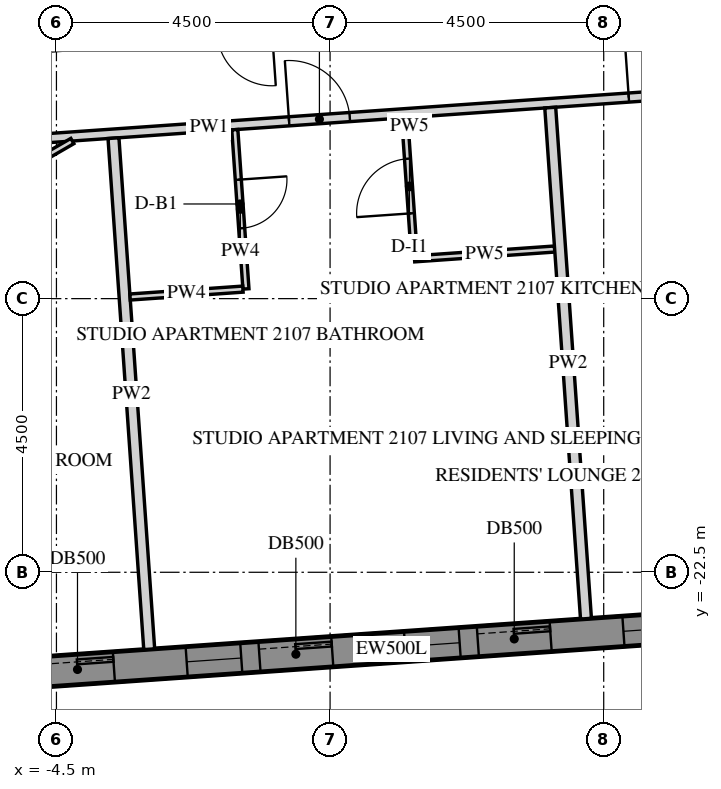
"""IFC4 building model, lengths in metres.
Left out: names, types, materials, properties, quantities, classifications, styles, units other than length and angle.
Written with IfcOpenShell. Run it as: python <this file> out.ifc"""

import sys

from ifc_helpers import new_model, si_unit, direction, frame, frame_2d, origin, place, context, subcontext, project, spatial, polyline, rectangle, outline, extrude, element, fill, save


model = new_model("IFC4")
c1 = context("Model", 3, precision=1e-05, world=origin(), true_north=direction((0.0, 1.0)))
c2 = subcontext(c1, "Body", "Model", "MODEL_VIEW")
j1 = project(units=[si_unit("LENGTHUNIT", "METRE"), si_unit("PLANEANGLEUNIT", "RADIAN")], contexts=[c1])
p1 = place(None, origin())
s1 = spatial("IfcSite", under=j1, at=p1, CompositionType="ELEMENT")
p2 = place(p1, origin())
s2 = spatial("IfcBuilding", under=s1, at=p2, CompositionType="ELEMENT")
p3 = place(p2, frame((0.0, 0.0, 267.9)))
s3 = spatial("IfcBuildingStorey", under=s2, at=p3, CompositionType="ELEMENT", Elevation=267.9)
p4 = place(p3, frame((-10.86, -24.567, -0.15), z_axis=(0.0, 0.0, 1.0), x_axis=(0.997564329317, 0.06975248292, 0.0)))
e1 = element("IfcWall", 1, at=p4, inside=s3, PredefinedType="SOLIDWALL", context=c2, shape_type="SweptSolid", body=[
    extrude(outline(polyline([(0.25, -0.25), (22.795, -0.25), (23.295, 0.25), (-0.25, 0.25), (0.25, -0.25)])), origin(), (0.0, 0.0, 1.0), 3.9),
])
p5 = place(p4, frame((1.323, 0.0, 1.05)))
e2 = element("IfcOpeningElement", 2, at=p5, cuts=e1, PredefinedType="OPENING", context=c2, shape_type="SweptSolid", body=[
    extrude(rectangle(XDim=0.9, YDim=1.5, at=frame_2d((0.45, 0.75))), frame((0.0, 0.26, 0.0), z_axis=(0.0, -1.0, 0.0), x_axis=(1.0, 0.0, 0.0)), (0.0, 0.0, 1.0), 0.52),
])
p6 = place(p4, frame((2.522, 0.0, 0.15)))
e3 = element("IfcOpeningElement", 3, at=p6, cuts=e1, PredefinedType="OPENING", context=c2, shape_type="SweptSolid", body=[
    extrude(rectangle(XDim=1.2, YDim=2.4, at=frame_2d((0.6, 1.2))), frame((0.0, 0.26, 0.0), z_axis=(0.0, -1.0, 0.0), x_axis=(1.0, 0.0, 0.0)), (0.0, 0.0, 1.0), 0.52),
])
p7 = place(p4, frame((4.922, 0.0, 1.05)))
e4 = element("IfcOpeningElement", 4, at=p7, cuts=e1, PredefinedType="OPENING", context=c2, shape_type="SweptSolid", body=[
    extrude(rectangle(XDim=0.9, YDim=1.5, at=frame_2d((0.45, 0.75))), frame((0.0, 0.26, 0.0), z_axis=(0.0, -1.0, 0.0), x_axis=(1.0, 0.0, 0.0)), (0.0, 0.0, 1.0), 0.52),
])
p8 = place(p4, frame((6.122, 0.0, 0.15)))
e5 = element("IfcOpeningElement", 5, at=p8, cuts=e1, PredefinedType="OPENING", context=c2, shape_type="SweptSolid", body=[
    extrude(rectangle(XDim=1.2, YDim=2.4, at=frame_2d((0.6, 1.2))), frame((0.0, 0.26, 0.0), z_axis=(0.0, -1.0, 0.0), x_axis=(1.0, 0.0, 0.0)), (0.0, 0.0, 1.0), 0.52),
])
p9 = place(p4, frame((8.522, 0.0, 1.05)))
e6 = element("IfcOpeningElement", 6, at=p9, cuts=e1, PredefinedType="OPENING", context=c2, shape_type="SweptSolid", body=[
    extrude(rectangle(XDim=0.9, YDim=1.5, at=frame_2d((0.45, 0.75))), frame((0.0, 0.26, 0.0), z_axis=(0.0, -1.0, 0.0), x_axis=(1.0, 0.0, 0.0)), (0.0, 0.0, 1.0), 0.52),
])
p10 = place(p4, frame((9.722, 0.0, 0.15)))
e7 = element("IfcOpeningElement", 7, at=p10, cuts=e1, PredefinedType="OPENING", context=c2, shape_type="SweptSolid", body=[
    extrude(rectangle(XDim=1.2, YDim=2.4, at=frame_2d((0.6, 1.2))), frame((0.0, 0.26, 0.0), z_axis=(0.0, -1.0, 0.0), x_axis=(1.0, 0.0, 0.0)), (0.0, 0.0, 1.0), 0.52),
])
p11 = place(p4, frame((12.122, 0.0, 1.05)))
e8 = element("IfcOpeningElement", 8, at=p11, cuts=e1, PredefinedType="OPENING", context=c2, shape_type="SweptSolid", body=[
    extrude(rectangle(XDim=0.9, YDim=1.5, at=frame_2d((0.45, 0.75))), frame((0.0, 0.26, 0.0), z_axis=(0.0, -1.0, 0.0), x_axis=(1.0, 0.0, 0.0)), (0.0, 0.0, 1.0), 0.52),
])
p12 = place(p4, frame((13.323, 0.0, 0.15)))
e9 = element("IfcOpeningElement", 9, at=p12, cuts=e1, PredefinedType="OPENING", context=c2, shape_type="SweptSolid", body=[
    extrude(rectangle(XDim=1.2, YDim=2.4, at=frame_2d((0.6, 1.2))), frame((0.0, 0.26, 0.0), z_axis=(0.0, -1.0, 0.0), x_axis=(1.0, 0.0, 0.0)), (0.0, 0.0, 1.0), 0.52),
])
p13 = place(p4, frame((15.722, 0.0, 1.05)))
e10 = element("IfcOpeningElement", 10, at=p13, cuts=e1, PredefinedType="OPENING", context=c2, shape_type="SweptSolid", body=[
    extrude(rectangle(XDim=0.9, YDim=1.5, at=frame_2d((0.45, 0.75))), frame((0.0, 0.26, 0.0), z_axis=(0.0, -1.0, 0.0), x_axis=(1.0, 0.0, 0.0)), (0.0, 0.0, 1.0), 0.52),
])
p14 = place(p4, frame((16.922, 0.0, 0.15)))
e11 = element("IfcOpeningElement", 11, at=p14, cuts=e1, PredefinedType="OPENING", context=c2, shape_type="SweptSolid", body=[
    extrude(rectangle(XDim=1.2, YDim=2.4, at=frame_2d((0.6, 1.2))), frame((0.0, 0.26, 0.0), z_axis=(0.0, -1.0, 0.0), x_axis=(1.0, 0.0, 0.0)), (0.0, 0.0, 1.0), 0.52),
])
p15 = place(p4, frame((19.323, 0.0, 1.05)))
e12 = element("IfcOpeningElement", 12, at=p15, cuts=e1, PredefinedType="OPENING", context=c2, shape_type="SweptSolid", body=[
    extrude(rectangle(XDim=0.9, YDim=1.5, at=frame_2d((0.45, 0.75))), frame((0.0, 0.26, 0.0), z_axis=(0.0, -1.0, 0.0), x_axis=(1.0, 0.0, 0.0)), (0.0, 0.0, 1.0), 0.52),
])
p16 = place(p4, frame((20.522, 0.0, 0.15)))
e13 = element("IfcOpeningElement", 13, at=p16, cuts=e1, PredefinedType="OPENING", context=c2, shape_type="SweptSolid", body=[
    extrude(rectangle(XDim=1.2, YDim=2.4, at=frame_2d((0.6, 1.2))), frame((0.0, 0.26, 0.0), z_axis=(0.0, -1.0, 0.0), x_axis=(1.0, 0.0, 0.0)), (0.0, 0.0, 1.0), 0.52),
])
p17 = place(p3, frame((-10.44, -15.767, 0.0), z_axis=(0.0, 0.0, 1.0), x_axis=(0.997565037323, 0.069742356651, 0.0)))
e14 = element("IfcWall", 14, at=p17, inside=s3, PredefinedType="PARTITIONING", context=c2, shape_type="SweptSolid", body=[
    extrude(rectangle(XDim=16.939, YDim=0.15, at=frame_2d((8.47, 0.0))), origin(), (0.0, 0.0, 1.0), 2.988),
])
p18 = place(p17, frame((9.79, 0.0, 0.0)))
e15 = element("IfcOpeningElement", 15, at=p18, cuts=e14, PredefinedType="OPENING", context=c2, shape_type="SweptSolid", body=[
    extrude(rectangle(XDim=1.0, YDim=2.1, at=frame_2d((0.5, 1.05))), frame((0.0, 0.085, 0.0), z_axis=(0.0, -1.0, 0.0), x_axis=(1.0, 0.0, 0.0)), (0.0, 0.0, 1.0), 0.17),
])
p19 = place(p17, frame((15.39, 0.0, 0.0)))
e16 = element("IfcOpeningElement", 16, at=p19, cuts=e14, PredefinedType="OPENING", context=c2, shape_type="SweptSolid", body=[
    extrude(rectangle(XDim=1.0, YDim=2.1, at=frame_2d((0.5, 1.05))), frame((0.0, 0.085, 0.0), z_axis=(0.0, -1.0, 0.0), x_axis=(1.0, 0.0, 0.0)), (0.0, 0.0, 1.0), 0.17),
])
p20 = place(p3, frame((6.884, -13.052, 0.0), z_axis=(0.0, 0.0, 1.0), x_axis=(-0.997564224443, -0.069753982764, 0.0)))
e17 = element("IfcWall", 17, at=p20, inside=s3, PredefinedType="PARTITIONING", context=c2, shape_type="SweptSolid", body=[
    extrude(rectangle(XDim=16.618, YDim=0.15, at=frame_2d((8.309, 0.0))), origin(), (0.0, 0.0, 1.0), 2.988),
])
p21 = place(p20, frame((7.859, 0.0, 0.0)))
e18 = element("IfcOpeningElement", 18, at=p21, cuts=e17, PredefinedType="OPENING", context=c2, shape_type="SweptSolid", body=[
    extrude(rectangle(XDim=0.9, YDim=2.1, at=frame_2d((0.45, 1.05))), frame((0.0, 0.085, 0.0), z_axis=(0.0, -1.0, 0.0), x_axis=(1.0, 0.0, 0.0)), (0.0, 0.0, 1.0), 0.17),
])
p22 = place(p3, frame((-4.238, -15.408, 0.0), z_axis=(0.0, 0.0, 1.0), x_axis=(-0.86602504101, -0.500000628343, 0.0)))
e19 = element("IfcWall", 19, at=p22, inside=s3, PredefinedType="PARTITIONING", context=c2, shape_type="SweptSolid", body=[
    extrude(rectangle(XDim=9.826, YDim=0.1, at=frame_2d((4.913, 0.0))), origin(), (0.0, 0.0, 1.0), 2.988),
])
p23 = place(p3, frame((-2.974, -23.765, 0.0), z_axis=(0.0, 0.0, 1.0), x_axis=(-0.069749826803, 0.997564515037, 0.0)))
e20 = element("IfcWall", 20, at=p23, inside=s3, PredefinedType="PARTITIONING", context=c2, shape_type="SweptSolid", body=[
    extrude(rectangle(XDim=8.425, YDim=0.18, at=frame_2d((4.212, 0.0))), origin(), (0.0, 0.0, 1.0), 2.988),
])
p24 = place(p3, frame((-1.567, -15.221, 0.0), z_axis=(0.0, 0.0, 1.0), x_axis=(0.069753235829, -0.997564276672, 0.0)))
e21 = element("IfcWall", 21, at=p24, inside=s3, PredefinedType="PARTITIONING", context=c2, shape_type="SweptSolid", body=[
    extrude(rectangle(XDim=2.625, YDim=0.1, at=frame_2d((1.312, 0.0))), origin(), (0.0, 0.0, 1.0), 2.988),
])
p25 = place(p24, frame((0.825, 0.0, 0.0)))
e22 = element("IfcOpeningElement", 22, at=p25, cuts=e21, PredefinedType="OPENING", context=c2, shape_type="SweptSolid", body=[
    extrude(rectangle(XDim=0.8, YDim=2.1, at=frame_2d((0.4, 1.05))), frame((0.0, 0.06, 0.0), z_axis=(0.0, -1.0, 0.0), x_axis=(1.0, 0.0, 0.0)), (0.0, 0.0, 1.0), 0.12),
])
p26 = place(p3, frame((-1.434, -17.844, 0.0), z_axis=(0.0, 0.0, 1.0), x_axis=(-0.997568101915, -0.069698508173, 0.0)))
e23 = element("IfcWall", 23, at=p26, inside=s3, PredefinedType="PARTITIONING", context=c2, shape_type="SweptSolid", body=[
    extrude(rectangle(XDim=1.86, YDim=0.1, at=frame_2d((0.93, 0.0))), origin(), (0.0, 0.0, 1.0), 2.988),
])
p27 = place(p3, frame((3.693, -17.184, 0.0), z_axis=(0.0, 0.0, 1.0), x_axis=(-0.997563824095, -0.069759707979, 0.0)))
e24 = element("IfcWall", 24, at=p27, inside=s3, PredefinedType="PARTITIONING", context=c2, shape_type="SweptSolid", body=[
    extrude(rectangle(XDim=2.31, YDim=0.1, at=frame_2d((1.155, 0.0))), origin(), (0.0, 0.0, 1.0), 2.988),
])
p28 = place(p3, frame((1.385, -17.295, 0.0), z_axis=(0.0, 0.0, 1.0), x_axis=(-0.069759707979, 0.997563824095, 0.0)))
e25 = element("IfcWall", 25, at=p28, inside=s3, PredefinedType="PARTITIONING", context=c2, shape_type="SweptSolid", body=[
    extrude(rectangle(XDim=2.275, YDim=0.1, at=frame_2d((1.137, 0.0))), origin(), (0.0, 0.0, 1.0), 2.988),
])
p29 = place(p28, frame((0.7, 0.0, 0.0)))
e26 = element("IfcOpeningElement", 26, at=p29, cuts=e25, PredefinedType="OPENING", context=c2, shape_type="SweptSolid", body=[
    extrude(rectangle(XDim=0.9, YDim=2.1, at=frame_2d((0.45, 1.05))), frame((0.0, 0.06, 0.0), z_axis=(0.0, -1.0, 0.0), x_axis=(1.0, 0.0, 0.0)), (0.0, 0.0, 1.0), 0.12),
])
p30 = place(p3, frame((4.208, -23.263, 0.0), z_axis=(0.0, 0.0, 1.0), x_axis=(-0.069749826803, 0.997564515037, 0.0)))
e27 = element("IfcWall", 27, at=p30, inside=s3, PredefinedType="PARTITIONING", context=c2, shape_type="SweptSolid", body=[
    extrude(rectangle(XDim=8.425, YDim=0.18, at=frame_2d((4.212, 0.0))), origin(), (0.0, 0.0, 1.0), 2.988),
])
p31 = place(p8, frame((0.0, 0.175, 0.0)))
e28 = element("IfcDoor", 28, at=p31, inside=s3, OperationType="SLIDING_TO_LEFT", PredefinedType="DOOR", context=c2, shape_type="SweptSolid", body=[
    extrude(rectangle(XDim=1.2, YDim=2.4, at=frame_2d((0.6, 1.2))), frame((0.0, 0.025, 0.0), z_axis=(0.0, -1.0, 0.0), x_axis=(1.0, 0.0, 0.0)), (0.0, 0.0, 1.0), 0.05),
])
fill(e5, e28)
p32 = place(p9, frame((0.0, 0.18, 0.0)))
e29 = element("IfcWindow", 29, at=p32, inside=s3, PartitioningType="SINGLE_PANEL", PredefinedType="WINDOW", context=c2, shape_type="SweptSolid", body=[
    extrude(rectangle(XDim=0.9, YDim=1.5, at=frame_2d((0.45, 0.75))), frame((0.0, 0.03, 0.0), z_axis=(0.0, -1.0, 0.0), x_axis=(1.0, 0.0, 0.0)), (0.0, 0.0, 1.0), 0.06),
])
fill(e6, e29)
p33 = place(p10, frame((0.0, 0.175, 0.0)))
e30 = element("IfcDoor", 30, at=p33, inside=s3, OperationType="SLIDING_TO_LEFT", PredefinedType="DOOR", context=c2, shape_type="SweptSolid", body=[
    extrude(rectangle(XDim=1.2, YDim=2.4, at=frame_2d((0.6, 1.2))), frame((0.0, 0.025, 0.0), z_axis=(0.0, -1.0, 0.0), x_axis=(1.0, 0.0, 0.0)), (0.0, 0.0, 1.0), 0.05),
])
fill(e7, e30)
p34 = place(p11, frame((0.0, 0.18, 0.0)))
e31 = element("IfcWindow", 31, at=p34, inside=s3, PartitioningType="SINGLE_PANEL", PredefinedType="WINDOW", context=c2, shape_type="SweptSolid", body=[
    extrude(rectangle(XDim=0.9, YDim=1.5, at=frame_2d((0.45, 0.75))), frame((0.0, 0.03, 0.0), z_axis=(0.0, -1.0, 0.0), x_axis=(1.0, 0.0, 0.0)), (0.0, 0.0, 1.0), 0.06),
])
fill(e8, e31)
p35 = place(p12, frame((0.0, 0.175, 0.0)))
e32 = element("IfcDoor", 32, at=p35, inside=s3, OperationType="SLIDING_TO_LEFT", PredefinedType="DOOR", context=c2, shape_type="SweptSolid", body=[
    extrude(rectangle(XDim=1.2, YDim=2.4, at=frame_2d((0.6, 1.2))), frame((0.0, 0.025, 0.0), z_axis=(0.0, -1.0, 0.0), x_axis=(1.0, 0.0, 0.0)), (0.0, 0.0, 1.0), 0.05),
])
fill(e9, e32)
p36 = place(p13, frame((0.0, 0.18, 0.0)))
e33 = element("IfcWindow", 33, at=p36, inside=s3, PartitioningType="SINGLE_PANEL", PredefinedType="WINDOW", context=c2, shape_type="SweptSolid", body=[
    extrude(rectangle(XDim=0.9, YDim=1.5, at=frame_2d((0.45, 0.75))), frame((0.0, 0.03, 0.0), z_axis=(0.0, -1.0, 0.0), x_axis=(1.0, 0.0, 0.0)), (0.0, 0.0, 1.0), 0.06),
])
fill(e10, e33)
p37 = place(p18, origin())
e34 = element("IfcDoor", 34, at=p37, inside=s3, OperationType="SINGLE_SWING_RIGHT", PredefinedType="DOOR", context=c2, shape_type="SweptSolid", body=[
    extrude(rectangle(XDim=1.0, YDim=2.1, at=frame_2d((0.5, 1.05))), frame((0.0, 0.025, 0.0), z_axis=(0.0, -1.0, 0.0), x_axis=(1.0, 0.0, 0.0)), (0.0, 0.0, 1.0), 0.05),
])
fill(e15, e34)
p38 = place(p25, origin())
e35 = element("IfcDoor", 35, at=p38, inside=s3, OperationType="SINGLE_SWING_RIGHT", PredefinedType="DOOR", context=c2, shape_type="SweptSolid", body=[
    extrude(rectangle(XDim=0.8, YDim=2.1, at=frame_2d((0.4, 1.05))), frame((0.0, 0.025, 0.0), z_axis=(0.0, -1.0, 0.0), x_axis=(1.0, 0.0, 0.0)), (0.0, 0.0, 1.0), 0.05),
])
fill(e22, e35)
p39 = place(p29, origin())
e36 = element("IfcDoor", 36, at=p39, inside=s3, OperationType="SINGLE_SWING_RIGHT", PredefinedType="DOOR", context=c2, shape_type="SweptSolid", body=[
    extrude(rectangle(XDim=0.9, YDim=2.1, at=frame_2d((0.45, 1.05))), frame((0.0, 0.025, 0.0), z_axis=(0.0, -1.0, 0.0), x_axis=(1.0, 0.0, 0.0)), (0.0, 0.0, 1.0), 0.05),
])
fill(e26, e36)
p40 = place(p19, origin())
e37 = element("IfcDoor", 37, at=p40, inside=s3, OperationType="SINGLE_SWING_LEFT", PredefinedType="DOOR", context=c2, shape_type="SweptSolid", body=[
    extrude(rectangle(XDim=1.0, YDim=2.1, at=frame_2d((0.5, 1.05))), frame((0.0, 0.025, 0.0), z_axis=(0.0, -1.0, 0.0), x_axis=(1.0, 0.0, 0.0)), (0.0, 0.0, 1.0), 0.05),
])
fill(e16, e37)
save(model, sys.argv[1])
